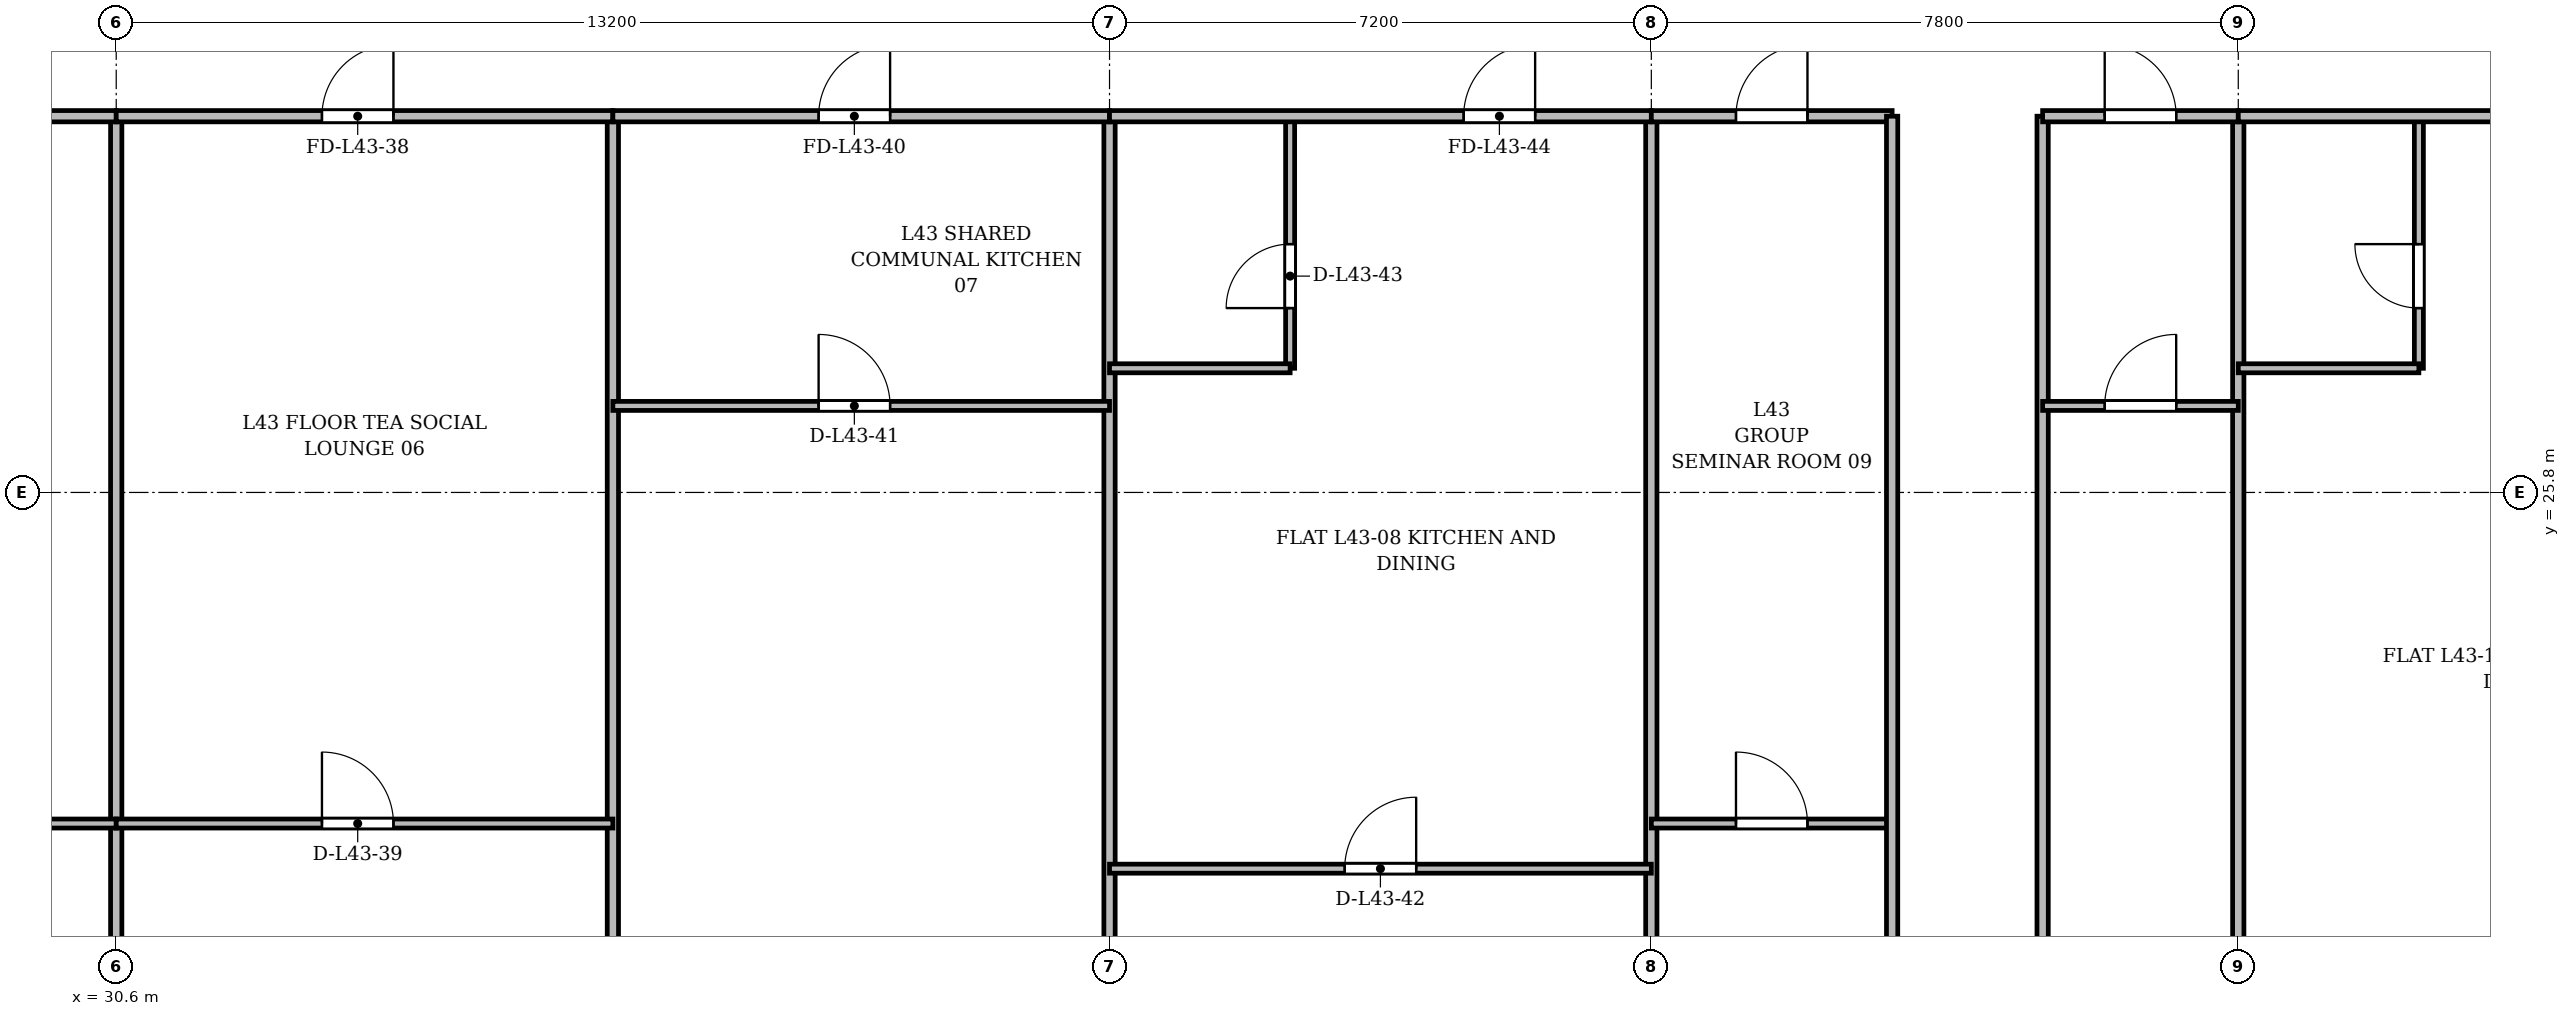
"""IFC4 building model, lengths in metres.
Left out: names, types, materials, properties, quantities, classifications, styles, units other than length and angle.
Written with IfcOpenShell. Run it as: python <this file> out.ifc"""

import sys

from ifc_helpers import new_model, si_unit, direction, frame, frame_2d, origin, place, context, subcontext, project, spatial, rectangle, extrude, source, transform, mapped, element, fill, save


model = new_model("IFC4")
c1 = context("Model", 3, precision=1e-05, world=origin(), true_north=direction((0.0, 1.0)))
c2 = subcontext(c1, "Body", "Model", "MODEL_VIEW")
j1 = project(units=[si_unit("LENGTHUNIT", "METRE"), si_unit("PLANEANGLEUNIT", "RADIAN")], contexts=[c1])
p1 = place(None, origin())
s1 = spatial("IfcSite", under=j1, at=p1, CompositionType="ELEMENT")
p2 = place(p1, origin())
s2 = spatial("IfcBuilding", under=s1, at=p2, CompositionType="ELEMENT")
p3 = place(p2, frame((0.0, 0.0, 164.5)))
s3 = spatial("IfcBuildingStorey", under=s2, at=p3, CompositionType="ELEMENT", Elevation=164.5)
p4 = place(p3, frame((30.6, 3.525, 0.0), z_axis=(0.0, 0.0, 1.0), x_axis=(0.0, 1.0, 0.0)))
e1 = element("IfcWall", 1, at=p4, inside=s3, PredefinedType="PARTITIONING", context=c2, shape_type="SweptSolid", body=[
    extrude(rectangle(XDim=27.275, YDim=0.15, at=frame_2d((13.638, 0.0))), origin(), (0.0, 0.0, 1.0), 2.85),
])
p5 = place(p3, frame((37.2, 3.525, 0.0), z_axis=(0.0, 0.0, 1.0), x_axis=(0.0, 1.0, 0.0)))
e2 = element("IfcWall", 2, at=p5, inside=s3, PredefinedType="PARTITIONING", context=c2, shape_type="SweptSolid", body=[
    extrude(rectangle(XDim=27.275, YDim=0.15, at=frame_2d((13.638, 0.0))), origin(), (0.0, 0.0, 1.0), 2.75),
])
for number, where, z_axis, x_axis in (
    (3, (43.8, 3.525, 0.0), (0.0, 0.0, 1.0), (0.0, 1.0, 0.0)),
    (4, (51.0, 3.525, 0.0), (0.0, 0.0, 1.0), (0.0, 1.0, 0.0)),
    (5, (58.8, 3.525, 0.0), (0.0, 0.0, 1.0), (0.0, 1.0, 0.0)),
):
    element("IfcWall", number, at=place(p3, frame(where, z_axis=z_axis, x_axis=x_axis)), inside=s3, PredefinedType="PARTITIONING", context=c2, shape_type="SweptSolid", body=[
        extrude(rectangle(XDim=27.275, YDim=0.15, at=frame_2d((13.638, 0.0))), origin(), (0.0, 0.0, 1.0), 2.85),
    ])
p6 = place(p3, frame((23.4, 30.8, 0.0), z_axis=(0.0, 0.0, 1.0), x_axis=(1.0, 0.0, 0.0)))
e6 = element("IfcWall", 6, at=p6, inside=s3, PredefinedType="PARTITIONING", context=c2, shape_type="SweptSolid", body=[
    extrude(rectangle(XDim=7.2, YDim=0.15, at=frame_2d((3.6, 0.0))), origin(), (0.0, 0.0, 1.0), 2.85),
])
p7 = place(p6, frame((3.125, 0.0, 0.0)))
e7 = element("IfcOpeningElement", 7, at=p7, cuts=e6, PredefinedType="OPENING", context=c2, shape_type="SweptSolid", body=[
    extrude(rectangle(XDim=0.95, YDim=2.15, at=frame_2d((0.475, 1.075))), frame((0.0, 0.085, 0.0), z_axis=(0.0, -1.0, 0.0), x_axis=(1.0, 0.0, 0.0)), (0.0, 0.0, 1.0), 0.17),
])
p8 = place(p3, frame((23.4, 21.4, 0.0), z_axis=(0.0, 0.0, 1.0), x_axis=(1.0, 0.0, 0.0)))
e8 = element("IfcWall", 8, at=p8, inside=s3, PredefinedType="PARTITIONING", context=c2, shape_type="SweptSolid", body=[
    extrude(rectangle(XDim=7.2, YDim=0.12, at=frame_2d((3.6, 0.0))), origin(), (0.0, 0.0, 1.0), 2.85),
])
p9 = place(p8, frame((3.125, 0.0, 0.0)))
e9 = element("IfcOpeningElement", 9, at=p9, cuts=e8, PredefinedType="OPENING", context=c2, shape_type="SweptSolid", body=[
    extrude(rectangle(XDim=0.95, YDim=2.15, at=frame_2d((0.475, 1.075))), frame((0.0, 0.07, 0.0), z_axis=(0.0, -1.0, 0.0), x_axis=(1.0, 0.0, 0.0)), (0.0, 0.0, 1.0), 0.14),
])
p10 = place(p3, frame((30.6, 30.8, 0.0), z_axis=(0.0, 0.0, 1.0), x_axis=(1.0, 0.0, 0.0)))
e10 = element("IfcWall", 10, at=p10, inside=s3, PredefinedType="PARTITIONING", context=c2, shape_type="SweptSolid", body=[
    extrude(rectangle(XDim=6.6, YDim=0.15, at=frame_2d((3.3, 0.0))), origin(), (0.0, 0.0, 1.0), 2.85),
])
p11 = place(p10, frame((2.734, 0.0, 0.0)))
e11 = element("IfcOpeningElement", 11, at=p11, cuts=e10, PredefinedType="OPENING", context=c2, shape_type="SweptSolid", body=[
    extrude(rectangle(XDim=0.95, YDim=2.15, at=frame_2d((0.475, 1.075))), frame((0.0, 0.085, 0.0), z_axis=(0.0, -1.0, 0.0), x_axis=(1.0, 0.0, 0.0)), (0.0, 0.0, 1.0), 0.17),
])
p12 = place(p3, frame((30.6, 21.4, 0.0), z_axis=(0.0, 0.0, 1.0), x_axis=(1.0, 0.0, 0.0)))
e12 = element("IfcWall", 12, at=p12, inside=s3, PredefinedType="PARTITIONING", context=c2, shape_type="SweptSolid", body=[
    extrude(rectangle(XDim=6.6, YDim=0.12, at=frame_2d((3.3, 0.0))), origin(), (0.0, 0.0, 1.0), 2.85),
])
p13 = place(p12, frame((2.734, 0.0, 0.0)))
e13 = element("IfcOpeningElement", 13, at=p13, cuts=e12, PredefinedType="OPENING", context=c2, shape_type="SweptSolid", body=[
    extrude(rectangle(XDim=0.95, YDim=2.15, at=frame_2d((0.475, 1.075))), frame((0.0, 0.07, 0.0), z_axis=(0.0, -1.0, 0.0), x_axis=(1.0, 0.0, 0.0)), (0.0, 0.0, 1.0), 0.14),
])
p14 = place(p3, frame((37.2, 30.8, 0.0), z_axis=(0.0, 0.0, 1.0), x_axis=(1.0, 0.0, 0.0)))
e14 = element("IfcWall", 14, at=p14, inside=s3, PredefinedType="PARTITIONING", context=c2, shape_type="SweptSolid", body=[
    extrude(rectangle(XDim=6.6, YDim=0.15, at=frame_2d((3.3, 0.0))), origin(), (0.0, 0.0, 1.0), 2.85),
])
p15 = place(p14, frame((2.734, 0.0, 0.0)))
e15 = element("IfcOpeningElement", 15, at=p15, cuts=e14, PredefinedType="OPENING", context=c2, shape_type="SweptSolid", body=[
    extrude(rectangle(XDim=0.95, YDim=2.15, at=frame_2d((0.475, 1.075))), frame((0.0, 0.085, 0.0), z_axis=(0.0, -1.0, 0.0), x_axis=(1.0, 0.0, 0.0)), (0.0, 0.0, 1.0), 0.17),
])
p16 = place(p3, frame((37.2, 26.95, 0.0), z_axis=(0.0, 0.0, 1.0), x_axis=(1.0, 0.0, 0.0)))
e16 = element("IfcWall", 16, at=p16, inside=s3, PredefinedType="PARTITIONING", context=c2, shape_type="SweptSolid", body=[
    extrude(rectangle(XDim=6.6, YDim=0.12, at=frame_2d((3.3, 0.0))), origin(), (0.0, 0.0, 1.0), 2.85),
])
p17 = place(p16, frame((2.734, 0.0, 0.0)))
e17 = element("IfcOpeningElement", 17, at=p17, cuts=e16, PredefinedType="OPENING", context=c2, shape_type="SweptSolid", body=[
    extrude(rectangle(XDim=0.95, YDim=2.15, at=frame_2d((0.475, 1.075))), frame((0.0, 0.07, 0.0), z_axis=(0.0, -1.0, 0.0), x_axis=(1.0, 0.0, 0.0)), (0.0, 0.0, 1.0), 0.14),
])
p18 = place(p3, frame((43.8, 20.8, 0.0), z_axis=(0.0, 0.0, 1.0), x_axis=(1.0, 0.0, 0.0)))
e18 = element("IfcWall", 18, at=p18, inside=s3, PredefinedType="PARTITIONING", context=c2, shape_type="SweptSolid", body=[
    extrude(rectangle(XDim=7.2, YDim=0.12, at=frame_2d((3.6, 0.0))), origin(), (0.0, 0.0, 1.0), 2.85),
])
p19 = place(p18, frame((3.125, 0.0, 0.0)))
e19 = element("IfcOpeningElement", 19, at=p19, cuts=e18, PredefinedType="OPENING", context=c2, shape_type="SweptSolid", body=[
    extrude(rectangle(XDim=0.95, YDim=2.15, at=frame_2d((0.475, 1.075))), frame((0.0, 0.07, 0.0), z_axis=(0.0, -1.0, 0.0), x_axis=(1.0, 0.0, 0.0)), (0.0, 0.0, 1.0), 0.14),
])
p20 = place(p3, frame((46.2, 27.45, 0.0), z_axis=(0.0, 0.0, 1.0), x_axis=(0.0, 1.0, 0.0)))
e20 = element("IfcWall", 20, at=p20, inside=s3, PredefinedType="PARTITIONING", context=c2, shape_type="SweptSolid", body=[
    extrude(rectangle(XDim=3.35, YDim=0.12, at=frame_2d((1.675, 0.0))), origin(), (0.0, 0.0, 1.0), 3.35),
])
p21 = place(p20, frame((0.8, 0.0, 0.0)))
e21 = element("IfcOpeningElement", 21, at=p21, cuts=e20, PredefinedType="OPENING", context=c2, shape_type="SweptSolid", body=[
    extrude(rectangle(XDim=0.85, YDim=2.1, at=frame_2d((0.425, 1.05))), frame((0.0, 0.07, 0.0), z_axis=(0.0, -1.0, 0.0), x_axis=(1.0, 0.0, 0.0)), (0.0, 0.0, 1.0), 0.14),
])
p22 = place(p3, frame((43.8, 27.45, 0.0), z_axis=(0.0, 0.0, 1.0), x_axis=(1.0, 0.0, 0.0)))
e22 = element("IfcWall", 22, at=p22, inside=s3, PredefinedType="PARTITIONING", context=c2, shape_type="SweptSolid", body=[
    extrude(rectangle(XDim=2.4, YDim=0.12, at=frame_2d((1.2, 0.0))), origin(), (0.0, 0.0, 1.0), 2.85),
])
p23 = place(p3, frame((43.8, 30.8, 0.0), z_axis=(0.0, 0.0, 1.0), x_axis=(1.0, 0.0, 0.0)))
e23 = element("IfcWall", 23, at=p23, inside=s3, PredefinedType="PARTITIONING", context=c2, shape_type="SweptSolid", body=[
    extrude(rectangle(XDim=7.2, YDim=0.15, at=frame_2d((3.6, 0.0))), origin(), (0.0, 0.0, 1.0), 2.85),
])
p24 = place(p23, frame((4.706, 0.0, 0.0)))
e24 = element("IfcOpeningElement", 24, at=p24, cuts=e23, PredefinedType="OPENING", context=c2, shape_type="SweptSolid", body=[
    extrude(rectangle(XDim=0.95, YDim=2.15, at=frame_2d((0.475, 1.075))), frame((0.0, 0.085, 0.0), z_axis=(0.0, -1.0, 0.0), x_axis=(1.0, 0.0, 0.0)), (0.0, 0.0, 1.0), 0.17),
])
p25 = place(p3, frame((51.0, 30.8, 0.0), z_axis=(0.0, 0.0, 1.0), x_axis=(1.0, 0.0, 0.0)))
e25 = element("IfcWall", 25, at=p25, inside=s3, PredefinedType="PARTITIONING", context=c2, shape_type="SweptSolid", body=[
    extrude(rectangle(XDim=3.2, YDim=0.15, at=frame_2d((1.6, 0.0))), origin(), (0.0, 0.0, 1.0), 2.85),
])
p26 = place(p25, frame((1.125, 0.0, 0.0)))
e26 = element("IfcOpeningElement", 26, at=p26, cuts=e25, PredefinedType="OPENING", context=c2, shape_type="SweptSolid", body=[
    extrude(rectangle(XDim=0.95, YDim=2.15, at=frame_2d((0.475, 1.075))), frame((0.0, 0.085, 0.0), z_axis=(0.0, -1.0, 0.0), x_axis=(1.0, 0.0, 0.0)), (0.0, 0.0, 1.0), 0.17),
])
p27 = place(p3, frame((51.0, 21.4, 0.0), z_axis=(0.0, 0.0, 1.0), x_axis=(1.0, 0.0, 0.0)))
e27 = element("IfcWall", 27, at=p27, inside=s3, PredefinedType="PARTITIONING", context=c2, shape_type="SweptSolid", body=[
    extrude(rectangle(XDim=3.2, YDim=0.12, at=frame_2d((1.6, 0.0))), origin(), (0.0, 0.0, 1.0), 2.85),
])
p28 = place(p27, frame((1.125, 0.0, 0.0)))
e28 = element("IfcOpeningElement", 28, at=p28, cuts=e27, PredefinedType="OPENING", context=c2, shape_type="SweptSolid", body=[
    extrude(rectangle(XDim=0.95, YDim=2.15, at=frame_2d((0.475, 1.075))), frame((0.0, 0.07, 0.0), z_axis=(0.0, -1.0, 0.0), x_axis=(1.0, 0.0, 0.0)), (0.0, 0.0, 1.0), 0.14),
])
for number, where, z_axis, x_axis in (
    (29, (54.2, 3.525, 0.0), (0.0, 0.0, 1.0), (0.0, 1.0, 0.0)),
    (30, (56.2, 3.525, 0.0), (0.0, 0.0, 1.0), (0.0, 1.0, 0.0)),
):
    element("IfcWall", number, at=place(p3, frame(where, z_axis=z_axis, x_axis=x_axis)), inside=s3, PredefinedType="PARTITIONING", context=c2, shape_type="SweptSolid", body=[
        extrude(rectangle(XDim=27.275, YDim=0.15, at=frame_2d((13.638, 0.0))), origin(), (0.0, 0.0, 1.0), 2.75),
    ])
p29 = place(p3, frame((56.2, 30.8, 0.0), z_axis=(0.0, 0.0, 1.0), x_axis=(1.0, 0.0, 0.0)))
e31 = element("IfcWall", 31, at=p29, inside=s3, PredefinedType="PARTITIONING", context=c2, shape_type="SweptSolid", body=[
    extrude(rectangle(XDim=2.6, YDim=0.15, at=frame_2d((1.3, 0.0))), origin(), (0.0, 0.0, 1.0), 2.85),
])
p30 = place(p29, frame((0.825, 0.0, 0.0)))
e32 = element("IfcOpeningElement", 32, at=p30, cuts=e31, PredefinedType="OPENING", context=c2, shape_type="SweptSolid", body=[
    extrude(rectangle(XDim=0.95, YDim=2.15, at=frame_2d((0.475, 1.075))), frame((0.0, 0.085, 0.0), z_axis=(0.0, -1.0, 0.0), x_axis=(1.0, 0.0, 0.0)), (0.0, 0.0, 1.0), 0.17),
])
p31 = place(p3, frame((56.2, 26.95, 0.0), z_axis=(0.0, 0.0, 1.0), x_axis=(1.0, 0.0, 0.0)))
e33 = element("IfcWall", 33, at=p31, inside=s3, PredefinedType="PARTITIONING", context=c2, shape_type="SweptSolid", body=[
    extrude(rectangle(XDim=2.6, YDim=0.12, at=frame_2d((1.3, 0.0))), origin(), (0.0, 0.0, 1.0), 2.85),
])
p32 = place(p31, frame((0.825, 0.0, 0.0)))
e34 = element("IfcOpeningElement", 34, at=p32, cuts=e33, PredefinedType="OPENING", context=c2, shape_type="SweptSolid", body=[
    extrude(rectangle(XDim=0.95, YDim=2.15, at=frame_2d((0.475, 1.075))), frame((0.0, 0.07, 0.0), z_axis=(0.0, -1.0, 0.0), x_axis=(1.0, 0.0, 0.0)), (0.0, 0.0, 1.0), 0.14),
])
p33 = place(p3, frame((61.2, 27.45, 0.0), z_axis=(0.0, 0.0, 1.0), x_axis=(0.0, 1.0, 0.0)))
e35 = element("IfcWall", 35, at=p33, inside=s3, PredefinedType="PARTITIONING", context=c2, shape_type="SweptSolid", body=[
    extrude(rectangle(XDim=3.35, YDim=0.12, at=frame_2d((1.675, 0.0))), origin(), (0.0, 0.0, 1.0), 3.35),
])
p34 = place(p33, frame((0.8, 0.0, 0.0)))
e36 = element("IfcOpeningElement", 36, at=p34, cuts=e35, PredefinedType="OPENING", context=c2, shape_type="SweptSolid", body=[
    extrude(rectangle(XDim=0.85, YDim=2.1, at=frame_2d((0.425, 1.05))), frame((0.0, 0.07, 0.0), z_axis=(0.0, -1.0, 0.0), x_axis=(1.0, 0.0, 0.0)), (0.0, 0.0, 1.0), 0.14),
])
p35 = place(p3, frame((58.8, 27.45, 0.0), z_axis=(0.0, 0.0, 1.0), x_axis=(1.0, 0.0, 0.0)))
e37 = element("IfcWall", 37, at=p35, inside=s3, PredefinedType="PARTITIONING", context=c2, shape_type="SweptSolid", body=[
    extrude(rectangle(XDim=2.4, YDim=0.12, at=frame_2d((1.2, 0.0))), origin(), (0.0, 0.0, 1.0), 2.85),
])
p36 = place(p3, frame((58.8, 30.8, 0.0), z_axis=(0.0, 0.0, 1.0), x_axis=(1.0, 0.0, 0.0)))
e38 = element("IfcWall", 38, at=p36, inside=s3, PredefinedType="PARTITIONING", context=c2, shape_type="SweptSolid", body=[
    extrude(rectangle(XDim=7.575, YDim=0.15, at=frame_2d((3.788, 0.0))), origin(), (0.0, 0.0, 1.0), 2.85),
])
p37 = place(p36, frame((5.073, 0.0, 0.0)))
e39 = element("IfcOpeningElement", 39, at=p37, cuts=e38, PredefinedType="OPENING", context=c2, shape_type="SweptSolid", body=[
    extrude(rectangle(XDim=0.95, YDim=2.15, at=frame_2d((0.475, 1.075))), frame((0.0, 0.085, 0.0), z_axis=(0.0, -1.0, 0.0), x_axis=(1.0, 0.0, 0.0)), (0.0, 0.0, 1.0), 0.17),
])
m1 = source(origin(), c2, "Body", "SweptSolid", [
    extrude(rectangle(XDim=0.95, YDim=2.15, at=frame_2d((0.475, 1.075))), frame((0.0, 0.025, 0.0), z_axis=(0.0, -1.0, 0.0), x_axis=(1.0, 0.0, 0.0)), (0.0, 0.0, 1.0), 0.05),
])
p38 = place(p11, origin())
e40 = element("IfcDoor", 40, at=p38, inside=s3, OperationType="SINGLE_SWING_RIGHT", PredefinedType="DOOR", context=c2, shape_type="MappedRepresentation", body=[
    mapped(m1, transform((0.0, 0.0, 0.0), x_axis=(1.0, 0.0, 0.0), y_axis=(0.0, 1.0, 0.0), z_axis=(0.0, 0.0, 1.0), scale=1.0)),
])
fill(e11, e40)
p39 = place(p13, origin())
e41 = element("IfcDoor", 41, at=p39, inside=s3, OperationType="SINGLE_SWING_LEFT", PredefinedType="DOOR", context=c2, shape_type="MappedRepresentation", body=[
    mapped(m1, transform((0.0, 0.0, 0.0), x_axis=(1.0, 0.0, 0.0), y_axis=(0.0, 1.0, 0.0), z_axis=(0.0, 0.0, 1.0), scale=1.0)),
])
fill(e13, e41)
p40 = place(p15, origin())
e42 = element("IfcDoor", 42, at=p40, inside=s3, OperationType="SINGLE_SWING_RIGHT", PredefinedType="DOOR", context=c2, shape_type="MappedRepresentation", body=[
    mapped(m1, transform((0.0, 0.0, 0.0), x_axis=(1.0, 0.0, 0.0), y_axis=(0.0, 1.0, 0.0), z_axis=(0.0, 0.0, 1.0), scale=1.0)),
])
fill(e15, e42)
p41 = place(p17, origin())
e43 = element("IfcDoor", 43, at=p41, inside=s3, OperationType="SINGLE_SWING_LEFT", PredefinedType="DOOR", context=c2, shape_type="MappedRepresentation", body=[
    mapped(m1, transform((0.0, 0.0, 0.0), x_axis=(1.0, 0.0, 0.0), y_axis=(0.0, 1.0, 0.0), z_axis=(0.0, 0.0, 1.0), scale=1.0)),
])
fill(e17, e43)
p42 = place(p19, origin())
e44 = element("IfcDoor", 44, at=p42, inside=s3, OperationType="SINGLE_SWING_RIGHT", PredefinedType="DOOR", context=c2, shape_type="MappedRepresentation", body=[
    mapped(m1, transform((0.0, 0.0, 0.0), x_axis=(1.0, 0.0, 0.0), y_axis=(0.0, 1.0, 0.0), z_axis=(0.0, 0.0, 1.0), scale=1.0)),
])
fill(e19, e44)
m2 = source(origin(), c2, "Body", "SweptSolid", [
    extrude(rectangle(XDim=0.85, YDim=2.1, at=frame_2d((0.425, 1.05))), frame((0.0, 0.025, 0.0), z_axis=(0.0, -1.0, 0.0), x_axis=(1.0, 0.0, 0.0)), (0.0, 0.0, 1.0), 0.05),
])
p43 = place(p21, origin())
e45 = element("IfcDoor", 45, at=p43, inside=s3, OperationType="SINGLE_SWING_LEFT", PredefinedType="DOOR", context=c2, shape_type="MappedRepresentation", body=[
    mapped(m2, transform((0.0, 0.0, 0.0), x_axis=(1.0, 0.0, 0.0), y_axis=(0.0, 1.0, 0.0), z_axis=(0.0, 0.0, 1.0), scale=1.0)),
])
fill(e21, e45)
p44 = place(p24, origin())
e46 = element("IfcDoor", 46, at=p44, inside=s3, OperationType="SINGLE_SWING_RIGHT", PredefinedType="DOOR", context=c2, shape_type="MappedRepresentation", body=[
    mapped(m1, transform((0.0, 0.0, 0.0), x_axis=(1.0, 0.0, 0.0), y_axis=(0.0, 1.0, 0.0), z_axis=(0.0, 0.0, 1.0), scale=1.0)),
])
fill(e24, e46)
p45 = place(p26, origin())
e47 = element("IfcDoor", 47, at=p45, inside=s3, OperationType="SINGLE_SWING_RIGHT", PredefinedType="DOOR", context=c2, shape_type="MappedRepresentation", body=[
    mapped(m1, transform((0.0, 0.0, 0.0), x_axis=(1.0, 0.0, 0.0), y_axis=(0.0, 1.0, 0.0), z_axis=(0.0, 0.0, 1.0), scale=1.0)),
])
fill(e26, e47)
p46 = place(p28, origin())
e48 = element("IfcDoor", 48, at=p46, inside=s3, OperationType="SINGLE_SWING_LEFT", PredefinedType="DOOR", context=c2, shape_type="MappedRepresentation", body=[
    mapped(m1, transform((0.0, 0.0, 0.0), x_axis=(1.0, 0.0, 0.0), y_axis=(0.0, 1.0, 0.0), z_axis=(0.0, 0.0, 1.0), scale=1.0)),
])
fill(e28, e48)
p47 = place(p30, origin())
e49 = element("IfcDoor", 49, at=p47, inside=s3, OperationType="SINGLE_SWING_LEFT", PredefinedType="DOOR", context=c2, shape_type="MappedRepresentation", body=[
    mapped(m1, transform((0.0, 0.0, 0.0), x_axis=(1.0, 0.0, 0.0), y_axis=(0.0, 1.0, 0.0), z_axis=(0.0, 0.0, 1.0), scale=1.0)),
])
fill(e32, e49)
p48 = place(p32, origin())
e50 = element("IfcDoor", 50, at=p48, inside=s3, OperationType="SINGLE_SWING_RIGHT", PredefinedType="DOOR", context=c2, shape_type="MappedRepresentation", body=[
    mapped(m1, transform((0.0, 0.0, 0.0), x_axis=(1.0, 0.0, 0.0), y_axis=(0.0, 1.0, 0.0), z_axis=(0.0, 0.0, 1.0), scale=1.0)),
])
fill(e34, e50)
p49 = place(p34, origin())
e51 = element("IfcDoor", 51, at=p49, inside=s3, OperationType="SINGLE_SWING_RIGHT", PredefinedType="DOOR", context=c2, shape_type="MappedRepresentation", body=[
    mapped(m2, transform((0.0, 0.0, 0.0), x_axis=(1.0, 0.0, 0.0), y_axis=(0.0, 1.0, 0.0), z_axis=(0.0, 0.0, 1.0), scale=1.0)),
])
fill(e36, e51)
save(model, sys.argv[1])
